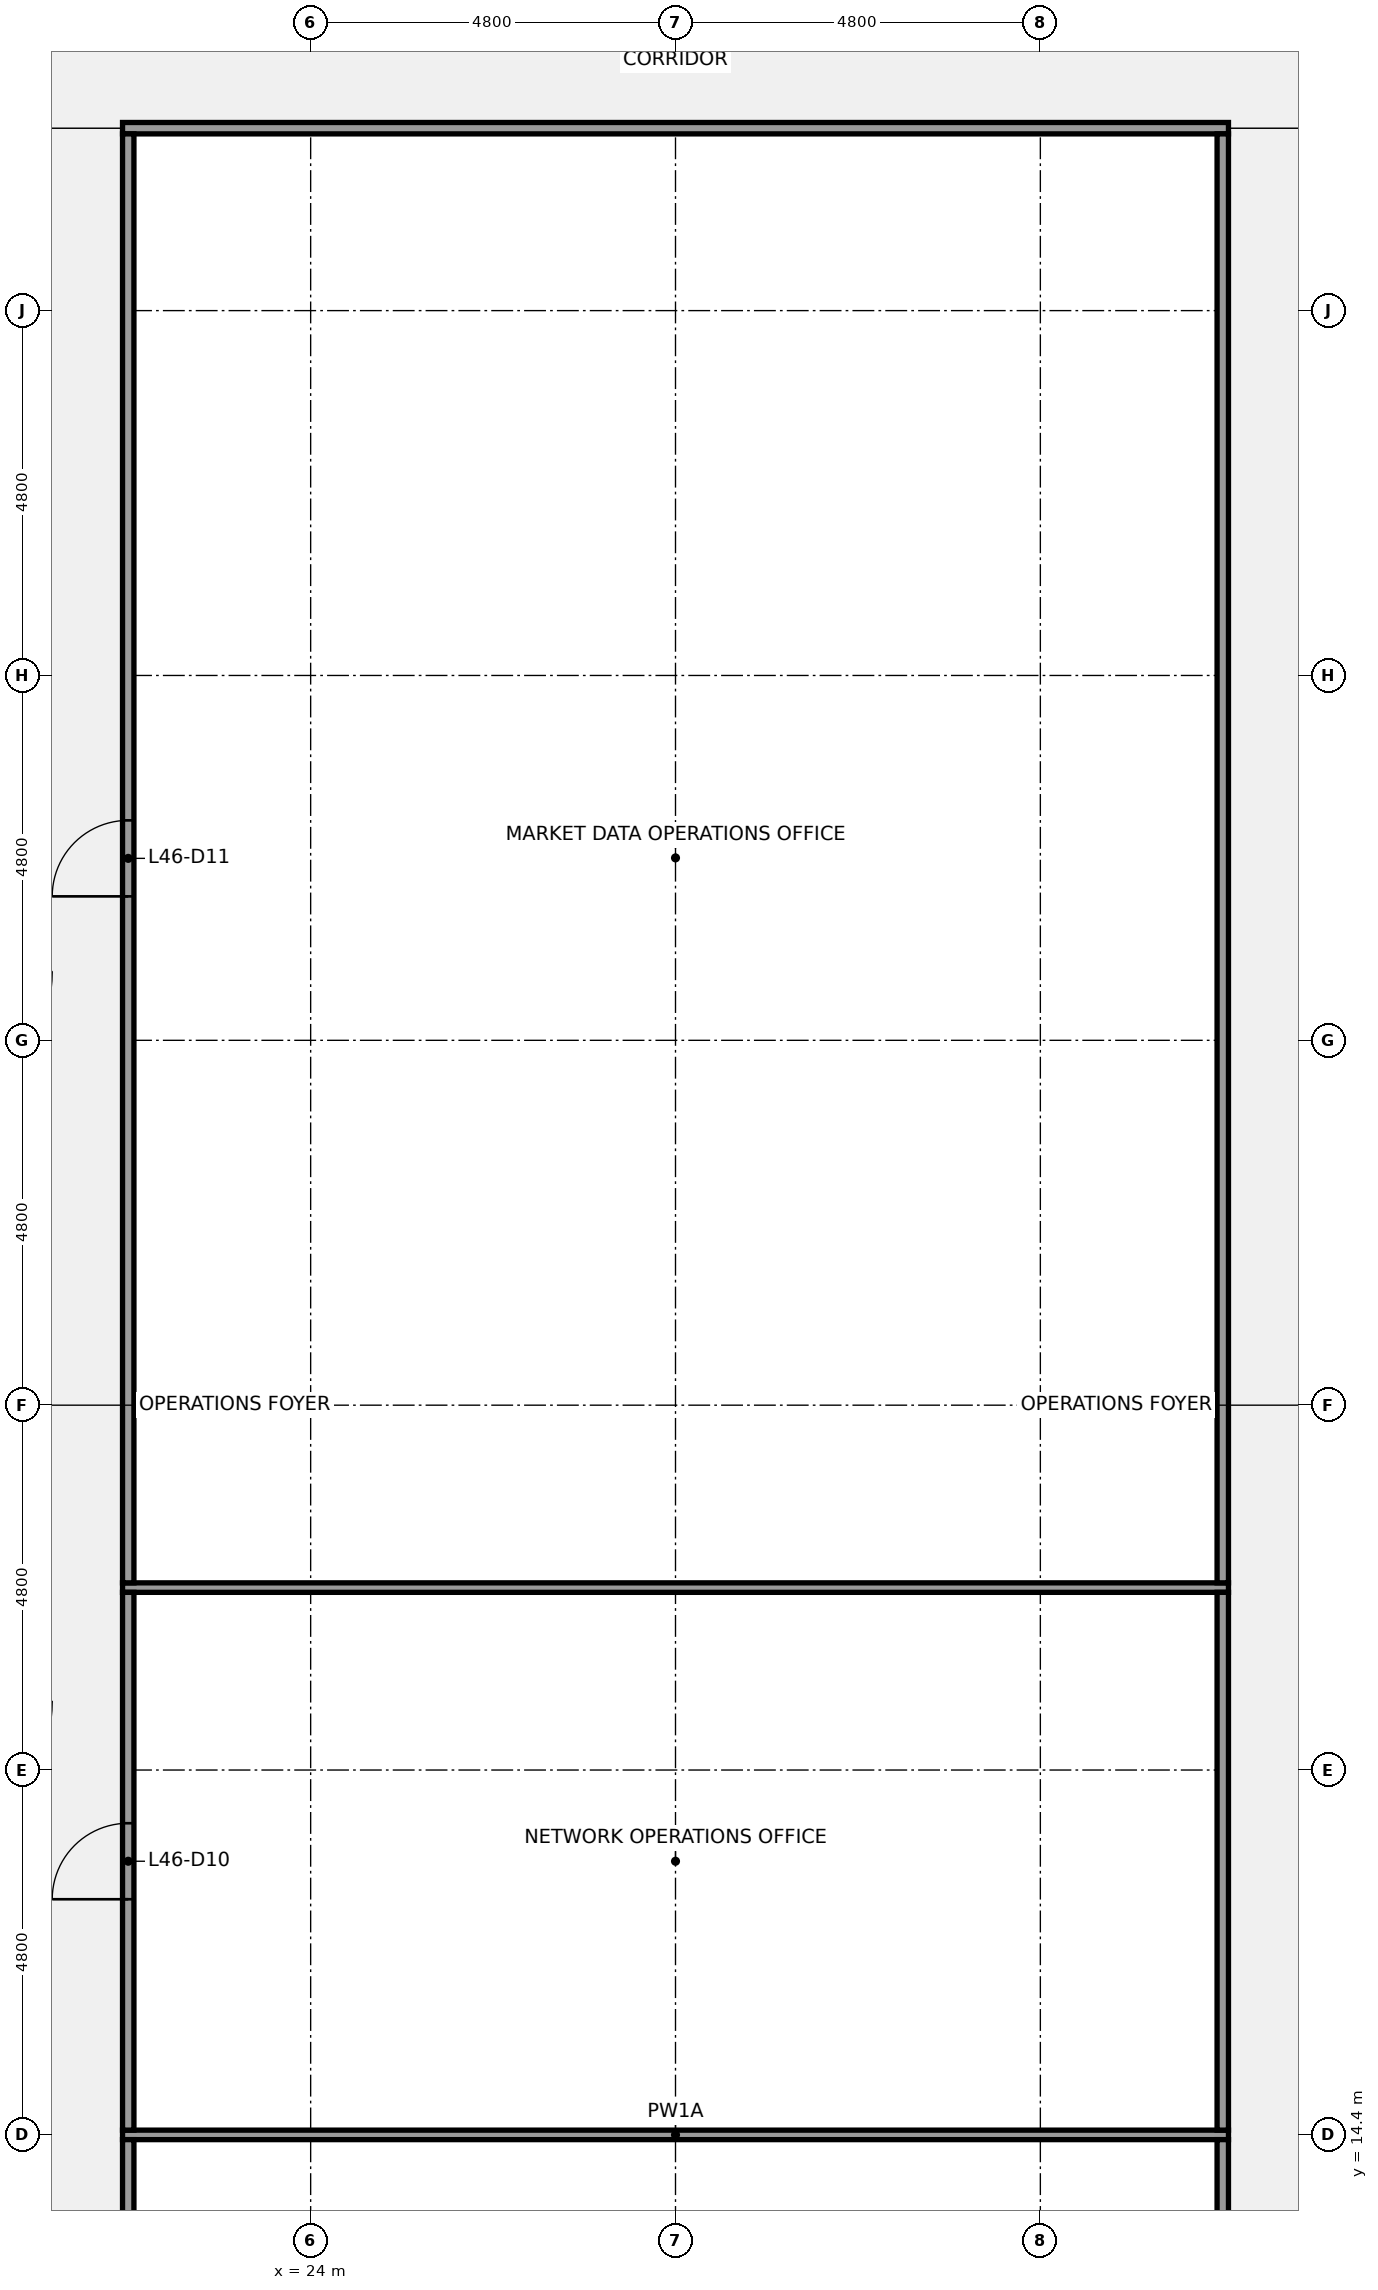
"""IFC4 building model, lengths in metres.
Left out: names, types, materials, properties, quantities, classifications, styles, units other than length and angle.
Written with IfcOpenShell. Run it as: python <this file> out.ifc"""

import sys

from ifc_helpers import new_model, si_unit, direction, frame, frame_2d, origin, place, context, subcontext, project, spatial, rectangle, extrude, element, fill, save


model = new_model("IFC4")
c1 = context("Model", 3, precision=1e-05, world=origin(), true_north=direction((0.0, 1.0)))
c2 = subcontext(c1, "Body", "Model", "MODEL_VIEW")
j1 = project(units=[si_unit("LENGTHUNIT", "METRE"), si_unit("PLANEANGLEUNIT", "RADIAN")], contexts=[c1])
p1 = place(None, origin())
s1 = spatial("IfcSite", under=j1, at=p1, CompositionType="ELEMENT")
p2 = place(p1, origin())
s2 = spatial("IfcBuilding", under=s1, at=p2, CompositionType="ELEMENT")
p3 = place(p2, frame((0.0, 0.0, 213.2)))
s3 = spatial("IfcBuildingStorey", under=s2, at=p3, CompositionType="ELEMENT", Elevation=213.2)
for number, where, z_axis, x_axis in (
    (1, (21.525, 14.4, 0.0), (0.0, 0.0, 1.0), (1.0, 0.0, 0.0)),
    (2, (21.525, 21.6, 0.0), (0.0, 0.0, 1.0), (1.0, 0.0, 0.0)),
):
    element("IfcWall", number, at=place(p3, frame(where, z_axis=z_axis, x_axis=x_axis)), inside=s3, PredefinedType="PARTITIONING", context=c2, shape_type="SweptSolid", body=[
        extrude(rectangle(XDim=14.55, YDim=0.125, at=frame_2d((7.275, 0.0))), origin(), (0.0, 0.0, 1.0), 2.87),
    ])
p4 = place(p3, frame((21.525, 40.8, 0.0), z_axis=(0.0, 0.0, 1.0), x_axis=(1.0, 0.0, 0.0)))
e3 = element("IfcWall", 3, at=p4, inside=s3, PredefinedType="PARTITIONING", context=c2, shape_type="SweptSolid", body=[
    extrude(rectangle(XDim=14.55, YDim=0.15, at=frame_2d((7.275, 0.0))), origin(), (0.0, 0.0, 1.0), 2.87),
])
p5 = place(p3, frame((21.6, 7.275, 0.0), z_axis=(0.0, 0.0, 1.0), x_axis=(0.0, 1.0, 0.0)))
e4 = element("IfcWall", 4, at=p5, inside=s3, PredefinedType="PARTITIONING", context=c2, shape_type="SweptSolid", body=[
    extrude(rectangle(XDim=7.062, YDim=0.15, at=frame_2d((3.531, 0.0))), origin(), (0.0, 0.0, 1.0), 2.87),
])
p6 = place(p3, frame((21.6, 14.462, 0.0), z_axis=(0.0, 0.0, 1.0), x_axis=(0.0, 1.0, 0.0)))
e5 = element("IfcWall", 5, at=p6, inside=s3, PredefinedType="PARTITIONING", context=c2, shape_type="SweptSolid", body=[
    extrude(rectangle(XDim=7.075, YDim=0.15, at=frame_2d((3.538, 0.0))), origin(), (0.0, 0.0, 1.0), 2.87),
])
p7 = place(p6, frame((3.038, 0.0, 0.0)))
e6 = element("IfcOpeningElement", 6, at=p7, cuts=e5, PredefinedType="OPENING", context=c2, shape_type="SweptSolid", body=[
    extrude(rectangle(XDim=1.0, YDim=2.1, at=frame_2d((0.5, 1.05))), frame((0.0, 0.085, 0.0), z_axis=(0.0, -1.0, 0.0), x_axis=(1.0, 0.0, 0.0)), (0.0, 0.0, 1.0), 0.17),
])
p8 = place(p3, frame((21.6, 21.663, 0.0), z_axis=(0.0, 0.0, 1.0), x_axis=(0.0, 1.0, 0.0)))
e7 = element("IfcWall", 7, at=p8, inside=s3, PredefinedType="PARTITIONING", context=c2, shape_type="SweptSolid", body=[
    extrude(rectangle(XDim=19.062, YDim=0.15, at=frame_2d((9.531, 0.0))), origin(), (0.0, 0.0, 1.0), 2.87),
])
p9 = place(p8, frame((9.031, 0.0, 0.0)))
e8 = element("IfcOpeningElement", 8, at=p9, cuts=e7, PredefinedType="OPENING", context=c2, shape_type="SweptSolid", body=[
    extrude(rectangle(XDim=1.0, YDim=2.1, at=frame_2d((0.5, 1.05))), frame((0.0, 0.085, 0.0), z_axis=(0.0, -1.0, 0.0), x_axis=(1.0, 0.0, 0.0)), (0.0, 0.0, 1.0), 0.17),
])
p10 = place(p3, frame((36.0, 7.275, 0.0), z_axis=(0.0, 0.0, 1.0), x_axis=(0.0, 1.0, 0.0)))
e9 = element("IfcWall", 9, at=p10, inside=s3, PredefinedType="PARTITIONING", context=c2, shape_type="SweptSolid", body=[
    extrude(rectangle(XDim=7.062, YDim=0.15, at=frame_2d((3.531, 0.0))), origin(), (0.0, 0.0, 1.0), 2.87),
])
p11 = place(p3, frame((36.0, 14.462, 0.0), z_axis=(0.0, 0.0, 1.0), x_axis=(0.0, 1.0, 0.0)))
e10 = element("IfcWall", 10, at=p11, inside=s3, PredefinedType="PARTITIONING", context=c2, shape_type="SweptSolid", body=[
    extrude(rectangle(XDim=7.075, YDim=0.15, at=frame_2d((3.538, 0.0))), origin(), (0.0, 0.0, 1.0), 2.87),
])
p12 = place(p3, frame((36.0, 21.663, 0.0), z_axis=(0.0, 0.0, 1.0), x_axis=(0.0, 1.0, 0.0)))
e11 = element("IfcWall", 11, at=p12, inside=s3, PredefinedType="PARTITIONING", context=c2, shape_type="SweptSolid", body=[
    extrude(rectangle(XDim=19.062, YDim=0.15, at=frame_2d((9.531, 0.0))), origin(), (0.0, 0.0, 1.0), 2.87),
])
p13 = place(p7, origin())
e12 = element("IfcDoor", 12, at=p13, inside=s3, OperationType="SINGLE_SWING_LEFT", PredefinedType="DOOR", context=c2, shape_type="SweptSolid", body=[
    extrude(rectangle(XDim=1.0, YDim=2.1, at=frame_2d((0.5, 1.05))), frame((0.0, 0.025, 0.0), z_axis=(0.0, -1.0, 0.0), x_axis=(1.0, 0.0, 0.0)), (0.0, 0.0, 1.0), 0.05),
])
fill(e6, e12)
p14 = place(p9, origin())
e13 = element("IfcDoor", 13, at=p14, inside=s3, OperationType="SINGLE_SWING_LEFT", PredefinedType="DOOR", context=c2, shape_type="SweptSolid", body=[
    extrude(rectangle(XDim=1.0, YDim=2.1, at=frame_2d((0.5, 1.05))), frame((0.0, 0.025, 0.0), z_axis=(0.0, -1.0, 0.0), x_axis=(1.0, 0.0, 0.0)), (0.0, 0.0, 1.0), 0.05),
])
fill(e8, e13)
save(model, sys.argv[1])
